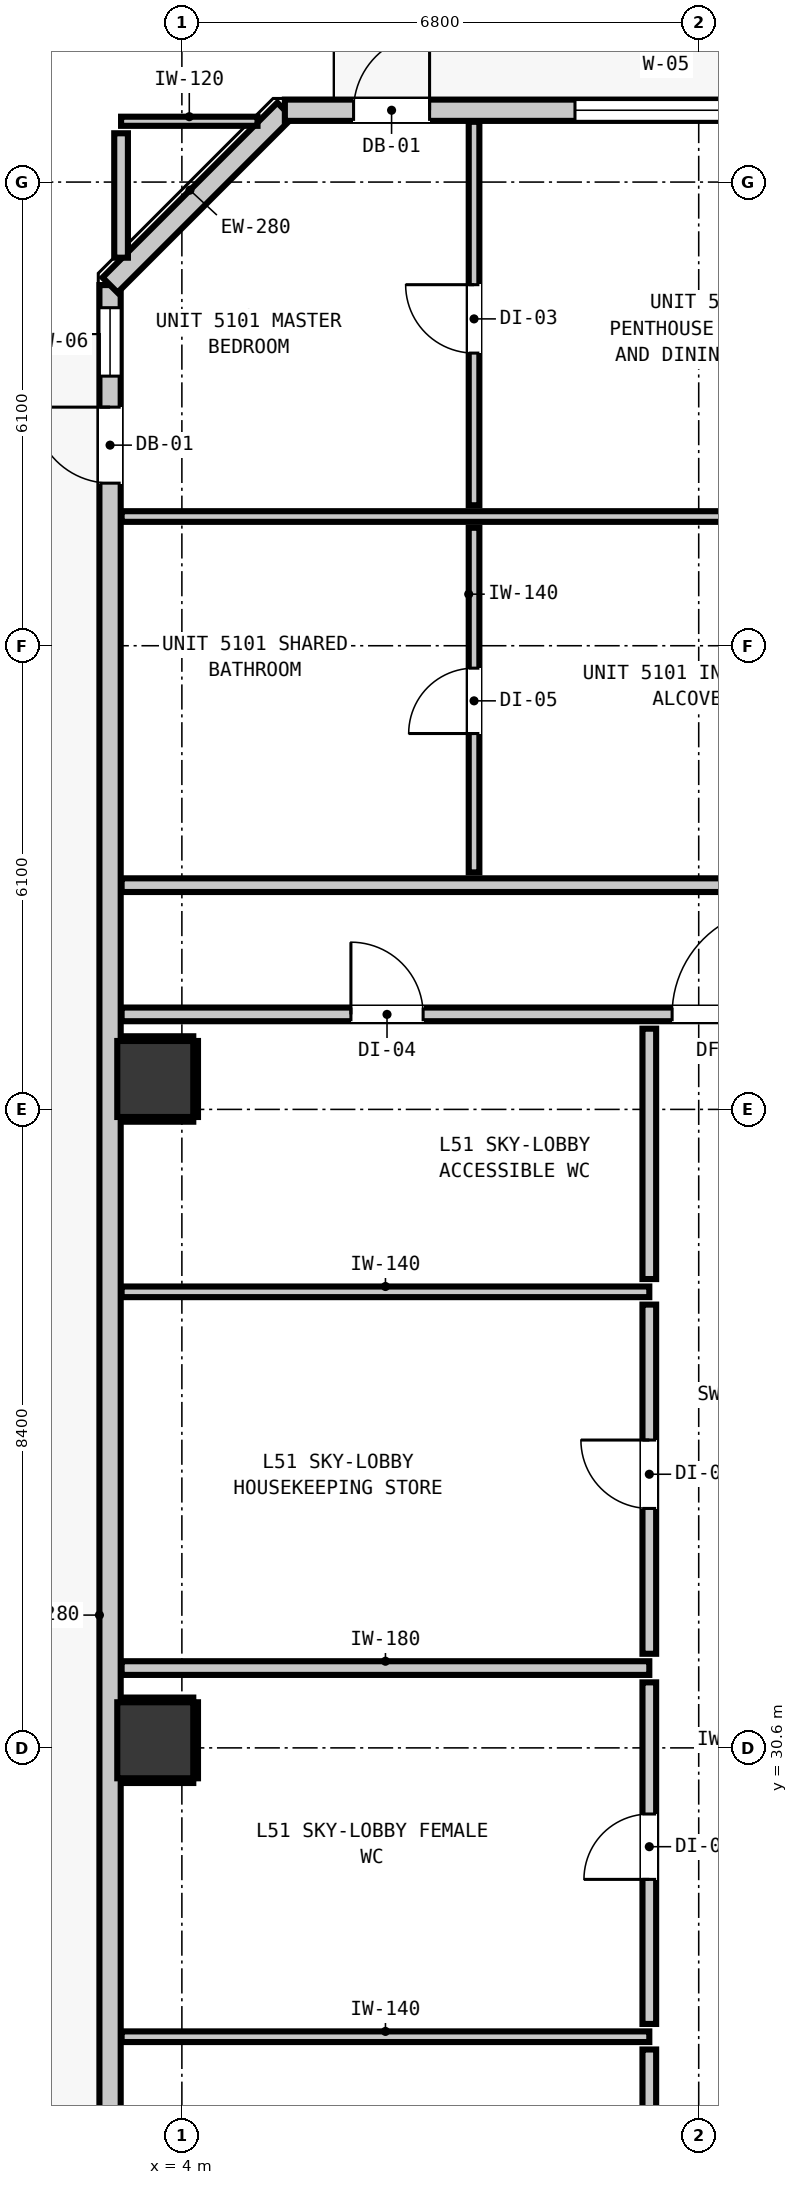
"""IFC4 building model, lengths in metres.
Left out: names, types, materials, properties, quantities, classifications, styles, units other than length and angle.
Written with IfcOpenShell. Run it as: python <this file> out.ifc"""

import sys

from ifc_helpers import new_model, si_unit, direction, frame, frame_2d, origin, origin_2d, place, context, subcontext, project, spatial, rectangle, extrude, element, fill, save


model = new_model("IFC4")
c1 = context("Model", 3, precision=1e-05, world=origin(), true_north=direction((0.0, 1.0)))
c2 = subcontext(c1, "Body", "Model", "MODEL_VIEW")
j1 = project(units=[si_unit("LENGTHUNIT", "METRE"), si_unit("PLANEANGLEUNIT", "RADIAN")], contexts=[c1])
p1 = place(None, origin())
s1 = spatial("IfcSite", under=j1, at=p1, CompositionType="ELEMENT")
p2 = place(p1, origin())
s2 = spatial("IfcBuilding", under=s1, at=p2, CompositionType="ELEMENT")
p3 = place(p2, frame((0.0, 0.0, 176.88)))
s3 = spatial("IfcBuildingStorey", under=s2, at=p3, CompositionType="ELEMENT", Elevation=176.88)
for number, where, z_axis, x_axis in (
    (1, (3.65, 30.7, 0.0), (0.0, 0.0, 1.0), (1.0, 0.0, 0.0)),
    (2, (3.65, 39.4, 0.0), (0.0, 0.0, 1.0), (1.0, 0.0, 0.0)),
):
    element("IfcColumn", number, at=place(p3, frame(where, z_axis=z_axis, x_axis=x_axis)), inside=s3, PredefinedType="COLUMN", context=c2, shape_type="SweptSolid", body=[
        extrude(rectangle(XDim=1.0, YDim=1.0, at=origin_2d()), origin(), (0.0, 0.0, 1.0), 3.32),
    ])
p4 = place(p3, frame((3.055, 17.555, 0.0), z_axis=(0.0, 0.0, 1.0), x_axis=(0.0, 1.0, 0.0)))
e3 = element("IfcWall", 3, at=p4, inside=s3, PredefinedType="STANDARD", context=c2, shape_type="SweptSolid", body=[
    extrude(rectangle(XDim=32.29, YDim=0.28, at=frame_2d((16.145, 0.0))), origin(), (0.0, 0.0, 1.0), 3.08),
])
p5 = place(p4, frame((29.684, 0.0, 0.0)))
e4 = element("IfcOpeningElement", 4, at=p5, cuts=e3, PredefinedType="OPENING", context=c2, shape_type="SweptSolid", body=[
    extrude(rectangle(XDim=1.0, YDim=2.15, at=frame_2d((0.5, 1.075))), frame((0.0, 0.15, 0.0), z_axis=(0.0, -1.0, 0.0), x_axis=(1.0, 0.0, 0.0)), (0.0, 0.0, 1.0), 0.3),
])
p6 = place(p4, frame((31.092, 0.0, 0.85)))
e5 = element("IfcOpeningElement", 5, at=p6, cuts=e3, PredefinedType="OPENING", context=c2, shape_type="SweptSolid", body=[
    extrude(rectangle(XDim=0.9, YDim=1.5, at=frame_2d((0.45, 0.75))), frame((0.0, 0.15, 0.0), z_axis=(0.0, -1.0, 0.0), x_axis=(1.0, 0.0, 0.0)), (0.0, 0.0, 1.0), 0.3),
])
p7 = place(p3, frame((3.055, 49.845, 0.0), z_axis=(0.0, 0.0, 1.0), x_axis=(0.707106781187, 0.707106781187, 0.0)))
e6 = element("IfcWall", 6, at=p7, inside=s3, PredefinedType="STANDARD", context=c2, shape_type="SweptSolid", body=[
    extrude(rectangle(XDim=3.253, YDim=0.28, at=frame_2d((1.626, 0.0))), origin(), (0.0, 0.0, 1.0), 3.08),
])
p8 = place(p3, frame((5.355, 52.145, 0.0), z_axis=(0.0, 0.0, 1.0), x_axis=(1.0, 0.0, 0.0)))
e7 = element("IfcWall", 7, at=p8, inside=s3, PredefinedType="STANDARD", context=c2, shape_type="SweptSolid", body=[
    extrude(rectangle(XDim=35.09, YDim=0.28, at=frame_2d((17.545, 0.0))), origin(), (0.0, 0.0, 1.0), 3.08),
])
p9 = place(p8, frame((0.904, 0.0, 0.0)))
e8 = element("IfcOpeningElement", 8, at=p9, cuts=e7, PredefinedType="OPENING", context=c2, shape_type="SweptSolid", body=[
    extrude(rectangle(XDim=1.0, YDim=2.15, at=frame_2d((0.5, 1.075))), frame((0.0, 0.15, 0.0), z_axis=(0.0, -1.0, 0.0), x_axis=(1.0, 0.0, 0.0)), (0.0, 0.0, 1.0), 0.3),
])
p10 = place(p8, frame((3.817, 0.0, 0.85)))
e9 = element("IfcOpeningElement", 9, at=p10, cuts=e7, PredefinedType="OPENING", context=c2, shape_type="SweptSolid", body=[
    extrude(rectangle(XDim=2.4, YDim=1.95, at=frame_2d((1.2, 0.975))), frame((0.0, 0.15, 0.0), z_axis=(0.0, -1.0, 0.0), x_axis=(1.0, 0.0, 0.0)), (0.0, 0.0, 1.0), 0.3),
])
p11 = place(p8, frame((16.495, 0.0, 0.85)))
e10 = element("IfcOpeningElement", 10, at=p11, cuts=e7, PredefinedType="OPENING", context=c2, shape_type="SweptSolid", body=[
    extrude(rectangle(XDim=2.4, YDim=1.95, at=frame_2d((1.2, 0.975))), frame((0.0, 0.15, 0.0), z_axis=(0.0, -1.0, 0.0), x_axis=(1.0, 0.0, 0.0)), (0.0, 0.0, 1.0), 0.3),
])
p12 = place(p8, frame((26.295, 0.0, 0.85)))
e11 = element("IfcOpeningElement", 11, at=p12, cuts=e7, PredefinedType="OPENING", context=c2, shape_type="SweptSolid", body=[
    extrude(rectangle(XDim=2.4, YDim=1.95, at=frame_2d((1.2, 0.975))), frame((0.0, 0.15, 0.0), z_axis=(0.0, -1.0, 0.0), x_axis=(1.0, 0.0, 0.0)), (0.0, 0.0, 1.0), 0.3),
])
p13 = place(p8, frame((20.33, 0.0, 0.85)))
e12 = element("IfcOpeningElement", 12, at=p13, cuts=e7, PredefinedType="OPENING", context=c2, shape_type="SweptSolid", body=[
    extrude(rectangle(XDim=1.05, YDim=1.65, at=frame_2d((0.525, 0.825))), frame((0.0, 0.15, 0.0), z_axis=(0.0, -1.0, 0.0), x_axis=(1.0, 0.0, 0.0)), (0.0, 0.0, 1.0), 0.3),
])
p14 = place(p8, frame((33.387, 0.0, 0.85)))
e13 = element("IfcOpeningElement", 13, at=p14, cuts=e7, PredefinedType="OPENING", context=c2, shape_type="SweptSolid", body=[
    extrude(rectangle(XDim=1.05, YDim=1.65, at=frame_2d((0.525, 0.825))), frame((0.0, 0.15, 0.0), z_axis=(0.0, -1.0, 0.0), x_axis=(1.0, 0.0, 0.0)), (0.0, 0.0, 1.0), 0.3),
])
p15 = place(p3, frame((3.207, 31.65, 0.0), z_axis=(0.0, 0.0, 1.0), x_axis=(1.0, 0.0, 0.0)))
e14 = element("IfcWall", 14, at=p15, inside=s3, PredefinedType="PARTITIONING", context=c2, shape_type="SweptSolid", body=[
    extrude(rectangle(XDim=6.943, YDim=0.18, at=frame_2d((3.471, 0.0))), origin(), (0.0, 0.0, 1.0), 3.08),
])
p16 = place(p3, frame((3.207, 40.25, 0.0), z_axis=(0.0, 0.0, 1.0), x_axis=(1.0, 0.0, 0.0)))
e15 = element("IfcWall", 15, at=p16, inside=s3, PredefinedType="PARTITIONING", context=c2, shape_type="SweptSolid", body=[
    extrude(rectangle(XDim=39.386, YDim=0.18, at=frame_2d((19.693, 0.0))), origin(), (0.0, 0.0, 1.0), 3.08),
])
p17 = place(p16, frame((14.228, 0.0, 0.0)))
e16 = element("IfcOpeningElement", 16, at=p17, cuts=e15, PredefinedType="OPENING", context=c2, shape_type="SweptSolid", body=[
    extrude(rectangle(XDim=1.4, YDim=2.15, at=frame_2d((0.7, 1.075))), frame((0.0, 0.1, 0.0), z_axis=(0.0, -1.0, 0.0), x_axis=(1.0, 0.0, 0.0)), (0.0, 0.0, 1.0), 0.2),
])
p18 = place(p16, frame((7.243, 0.0, 0.0)))
e17 = element("IfcOpeningElement", 17, at=p18, cuts=e15, PredefinedType="OPENING", context=c2, shape_type="SweptSolid", body=[
    extrude(rectangle(XDim=1.4, YDim=2.15, at=frame_2d((0.7, 1.075))), frame((0.0, 0.1, 0.0), z_axis=(0.0, -1.0, 0.0), x_axis=(1.0, 0.0, 0.0)), (0.0, 0.0, 1.0), 0.2),
])
p19 = place(p16, frame((3.017, 0.0, 0.0)))
e18 = element("IfcOpeningElement", 18, at=p19, cuts=e15, PredefinedType="OPENING", context=c2, shape_type="SweptSolid", body=[
    extrude(rectangle(XDim=0.95, YDim=2.1, at=frame_2d((0.475, 1.05))), frame((0.0, 0.1, 0.0), z_axis=(0.0, -1.0, 0.0), x_axis=(1.0, 0.0, 0.0)), (0.0, 0.0, 1.0), 0.2),
])
p20 = place(p3, frame((3.207, 41.95, 0.0), z_axis=(0.0, 0.0, 1.0), x_axis=(1.0, 0.0, 0.0)))
e19 = element("IfcWall", 19, at=p20, inside=s3, PredefinedType="PARTITIONING", context=c2, shape_type="SweptSolid", body=[
    extrude(rectangle(XDim=39.386, YDim=0.18, at=frame_2d((19.693, 0.0))), origin(), (0.0, 0.0, 1.0), 3.08),
])
p21 = place(p20, frame((9.55, 0.0, 0.0)))
e20 = element("IfcOpeningElement", 20, at=p21, cuts=e19, PredefinedType="OPENING", context=c2, shape_type="SweptSolid", body=[
    extrude(rectangle(XDim=1.0, YDim=2.15, at=frame_2d((0.5, 1.075))), frame((0.0, 0.1, 0.0), z_axis=(0.0, -1.0, 0.0), x_axis=(1.0, 0.0, 0.0)), (0.0, 0.0, 1.0), 0.2),
])
p22 = place(p20, frame((29.143, 0.0, 0.0)))
e21 = element("IfcOpeningElement", 21, at=p22, cuts=e19, PredefinedType="OPENING", context=c2, shape_type="SweptSolid", body=[
    extrude(rectangle(XDim=1.0, YDim=2.15, at=frame_2d((0.5, 1.075))), frame((0.0, 0.1, 0.0), z_axis=(0.0, -1.0, 0.0), x_axis=(1.0, 0.0, 0.0)), (0.0, 0.0, 1.0), 0.2),
])
for number, where, z_axis, x_axis in (
    (22, (3.207, 26.8, 0.0), (0.0, 0.0, 1.0), (1.0, 0.0, 0.0)),
    (23, (3.207, 36.6, 0.0), (0.0, 0.0, 1.0), (1.0, 0.0, 0.0)),
):
    element("IfcWall", number, at=place(p3, frame(where, z_axis=z_axis, x_axis=x_axis)), inside=s3, PredefinedType="PARTITIONING", context=c2, shape_type="SweptSolid", body=[
        extrude(rectangle(XDim=6.943, YDim=0.14, at=frame_2d((3.471, 0.0))), origin(), (0.0, 0.0, 1.0), 3.08),
    ])
p23 = place(p3, frame((3.207, 46.8, 0.0), z_axis=(0.0, 0.0, 1.0), x_axis=(1.0, 0.0, 0.0)))
e24 = element("IfcWall", 24, at=p23, inside=s3, PredefinedType="PARTITIONING", context=c2, shape_type="SweptSolid", body=[
    extrude(rectangle(XDim=39.386, YDim=0.14, at=frame_2d((19.693, 0.0))), origin(), (0.0, 0.0, 1.0), 3.08),
])
p24 = place(p23, frame((9.6, 0.0, 0.0)))
e25 = element("IfcOpeningElement", 25, at=p24, cuts=e24, PredefinedType="OPENING", context=c2, shape_type="SweptSolid", body=[
    extrude(rectangle(XDim=0.9, YDim=2.1, at=frame_2d((0.45, 1.05))), frame((0.0, 0.08, 0.0), z_axis=(0.0, -1.0, 0.0), x_axis=(1.0, 0.0, 0.0)), (0.0, 0.0, 1.0), 0.16),
])
p25 = place(p23, frame((29.193, 0.0, 0.0)))
e26 = element("IfcOpeningElement", 26, at=p25, cuts=e24, PredefinedType="OPENING", context=c2, shape_type="SweptSolid", body=[
    extrude(rectangle(XDim=0.9, YDim=2.1, at=frame_2d((0.45, 1.05))), frame((0.0, 0.08, 0.0), z_axis=(0.0, -1.0, 0.0), x_axis=(1.0, 0.0, 0.0)), (0.0, 0.0, 1.0), 0.16),
])
p26 = place(p3, frame((3.2, 52.0, 0.0), z_axis=(0.0, 0.0, 1.0), x_axis=(1.0, 0.0, 0.0)))
e27 = element("IfcWall", 27, at=p26, inside=s3, PredefinedType="PARTITIONING", context=c2, shape_type="SweptSolid", body=[
    extrude(rectangle(XDim=1.795, YDim=0.12, at=frame_2d((0.897, 0.0))), origin(), (0.0, 0.0, 1.0), 3.08),
])
p27 = place(p3, frame((3.2, 50.205, 0.0), z_axis=(0.0, 0.0, 1.0), x_axis=(0.0, 1.0, 0.0)))
e28 = element("IfcWall", 28, at=p27, inside=s3, PredefinedType="PARTITIONING", context=c2, shape_type="SweptSolid", body=[
    extrude(rectangle(XDim=1.637, YDim=0.18, at=frame_2d((0.818, 0.0))), origin(), (0.0, 0.0, 1.0), 3.08),
])
p28 = place(p3, frame((10.15, 21.368, 0.0), z_axis=(0.0, 0.0, 1.0), x_axis=(0.0, 1.0, 0.0)))
e29 = element("IfcWall", 29, at=p28, inside=s3, PredefinedType="PARTITIONING", context=c2, shape_type="SweptSolid", body=[
    extrude(rectangle(XDim=5.264, YDim=0.18, at=frame_2d((2.632, 0.0))), origin(), (0.0, 0.0, 1.0), 3.08),
])
p29 = place(p3, frame((10.15, 26.968, 0.0), z_axis=(0.0, 0.0, 1.0), x_axis=(0.0, 1.0, 0.0)))
e30 = element("IfcWall", 30, at=p29, inside=s3, PredefinedType="PARTITIONING", context=c2, shape_type="SweptSolid", body=[
    extrude(rectangle(XDim=4.494, YDim=0.18, at=frame_2d((2.247, 0.0))), origin(), (0.0, 0.0, 1.0), 3.08),
])
p30 = place(p29, frame((1.902, 0.0, 0.0)))
e31 = element("IfcOpeningElement", 31, at=p30, cuts=e30, PredefinedType="OPENING", context=c2, shape_type="SweptSolid", body=[
    extrude(rectangle(XDim=0.86, YDim=2.02, at=frame_2d((0.43, 1.01))), frame((0.0, 0.1, 0.0), z_axis=(0.0, -1.0, 0.0), x_axis=(1.0, 0.0, 0.0)), (0.0, 0.0, 1.0), 0.2),
])
p31 = place(p3, frame((10.15, 31.838, 0.0), z_axis=(0.0, 0.0, 1.0), x_axis=(0.0, 1.0, 0.0)))
e32 = element("IfcWall", 32, at=p31, inside=s3, PredefinedType="PARTITIONING", context=c2, shape_type="SweptSolid", body=[
    extrude(rectangle(XDim=4.594, YDim=0.18, at=frame_2d((2.297, 0.0))), origin(), (0.0, 0.0, 1.0), 3.08),
])
p32 = place(p31, frame((1.912, 0.0, 0.0)))
e33 = element("IfcOpeningElement", 33, at=p32, cuts=e32, PredefinedType="OPENING", context=c2, shape_type="SweptSolid", body=[
    extrude(rectangle(XDim=0.9, YDim=2.1, at=frame_2d((0.45, 1.05))), frame((0.0, 0.1, 0.0), z_axis=(0.0, -1.0, 0.0), x_axis=(1.0, 0.0, 0.0)), (0.0, 0.0, 1.0), 0.2),
])
p33 = place(p3, frame((10.15, 36.768, 0.0), z_axis=(0.0, 0.0, 1.0), x_axis=(0.0, 1.0, 0.0)))
e34 = element("IfcWall", 34, at=p33, inside=s3, PredefinedType="PARTITIONING", context=c2, shape_type="SweptSolid", body=[
    extrude(rectangle(XDim=3.294, YDim=0.18, at=frame_2d((1.647, 0.0))), origin(), (0.0, 0.0, 1.0), 3.08),
])
p34 = place(p3, frame((7.844, 42.118, 0.0), z_axis=(0.0, 0.0, 1.0), x_axis=(0.0, 1.0, 0.0)))
e35 = element("IfcWall", 35, at=p34, inside=s3, PredefinedType="PARTITIONING", context=c2, shape_type="SweptSolid", body=[
    extrude(rectangle(XDim=4.534, YDim=0.14, at=frame_2d((2.267, 0.0))), origin(), (0.0, 0.0, 1.0), 3.08),
])
p35 = place(p34, frame((1.827, 0.0, 0.0)))
e36 = element("IfcOpeningElement", 36, at=p35, cuts=e35, PredefinedType="OPENING", context=c2, shape_type="SweptSolid", body=[
    extrude(rectangle(XDim=0.86, YDim=2.02, at=frame_2d((0.43, 1.01))), frame((0.0, 0.08, 0.0), z_axis=(0.0, -1.0, 0.0), x_axis=(1.0, 0.0, 0.0)), (0.0, 0.0, 1.0), 0.16),
])
p36 = place(p3, frame((7.844, 46.948, 0.0), z_axis=(0.0, 0.0, 1.0), x_axis=(0.0, 1.0, 0.0)))
e37 = element("IfcWall", 37, at=p36, inside=s3, PredefinedType="PARTITIONING", context=c2, shape_type="SweptSolid", body=[
    extrude(rectangle(XDim=5.045, YDim=0.14, at=frame_2d((2.522, 0.0))), origin(), (0.0, 0.0, 1.0), 3.08),
])
p37 = place(p36, frame((2.002, 0.0, 0.0)))
e38 = element("IfcOpeningElement", 38, at=p37, cuts=e37, PredefinedType="OPENING", context=c2, shape_type="SweptSolid", body=[
    extrude(rectangle(XDim=0.9, YDim=2.1, at=frame_2d((0.45, 1.05))), frame((0.0, 0.08, 0.0), z_axis=(0.0, -1.0, 0.0), x_axis=(1.0, 0.0, 0.0)), (0.0, 0.0, 1.0), 0.16),
])
for number, where, z_axis, x_axis in (
    (39, (3.21, 30.168, 0.0), (0.0, 0.0, 1.0), (1.0, 0.0, 0.0)),
    (40, (3.21, 31.232, 0.0), (0.0, 0.0, 1.0), (1.0, 0.0, 0.0)),
):
    element("IfcWall", number, at=place(p3, frame(where, z_axis=z_axis, x_axis=x_axis)), inside=s3, PredefinedType="PARTITIONING", context=c2, shape_type="SweptSolid", body=[
        extrude(rectangle(XDim=0.94, YDim=0.06, at=frame_2d((0.47, 0.0))), origin(), (0.0, 0.0, 1.0), 1.45),
    ])
p38 = place(p3, frame((4.182, 30.2, 0.0), z_axis=(0.0, 0.0, 1.0), x_axis=(0.0, 1.0, 0.0)))
e41 = element("IfcWall", 41, at=p38, inside=s3, PredefinedType="PARTITIONING", context=c2, shape_type="SweptSolid", body=[
    extrude(rectangle(XDim=1.0, YDim=0.06, at=frame_2d((0.5, 0.0))), origin(), (0.0, 0.0, 1.0), 1.45),
])
for number, where, z_axis, x_axis in (
    (42, (3.21, 38.868, 0.0), (0.0, 0.0, 1.0), (1.0, 0.0, 0.0)),
    (43, (3.21, 39.932, 0.0), (0.0, 0.0, 1.0), (1.0, 0.0, 0.0)),
):
    element("IfcWall", number, at=place(p3, frame(where, z_axis=z_axis, x_axis=x_axis)), inside=s3, PredefinedType="PARTITIONING", context=c2, shape_type="SweptSolid", body=[
        extrude(rectangle(XDim=0.94, YDim=0.06, at=frame_2d((0.47, 0.0))), origin(), (0.0, 0.0, 1.0), 1.45),
    ])
p39 = place(p3, frame((4.182, 38.9, 0.0), z_axis=(0.0, 0.0, 1.0), x_axis=(0.0, 1.0, 0.0)))
e44 = element("IfcWall", 44, at=p39, inside=s3, PredefinedType="PARTITIONING", context=c2, shape_type="SweptSolid", body=[
    extrude(rectangle(XDim=1.0, YDim=0.06, at=frame_2d((0.5, 0.0))), origin(), (0.0, 0.0, 1.0), 1.45),
])
p40 = place(p9, origin())
e45 = element("IfcDoor", 45, at=p40, inside=s3, OperationType="SINGLE_SWING_RIGHT", PredefinedType="DOOR", context=c2, shape_type="SweptSolid", body=[
    extrude(rectangle(XDim=1.0, YDim=2.15, at=frame_2d((0.5, 1.075))), frame((0.0, 0.025, 0.0), z_axis=(0.0, -1.0, 0.0), x_axis=(1.0, 0.0, 0.0)), (0.0, 0.0, 1.0), 0.05),
])
fill(e8, e45)
p41 = place(p5, origin())
e46 = element("IfcDoor", 46, at=p41, inside=s3, OperationType="SINGLE_SWING_RIGHT", PredefinedType="DOOR", context=c2, shape_type="SweptSolid", body=[
    extrude(rectangle(XDim=1.0, YDim=2.15, at=frame_2d((0.5, 1.075))), frame((0.0, 0.025, 0.0), z_axis=(0.0, -1.0, 0.0), x_axis=(1.0, 0.0, 0.0)), (0.0, 0.0, 1.0), 0.05),
])
fill(e4, e46)
p42 = place(p6, origin())
e47 = element("IfcWindow", 47, at=p42, inside=s3, PartitioningType="SINGLE_PANEL", PredefinedType="WINDOW", context=c2, shape_type="SweptSolid", body=[
    extrude(rectangle(XDim=0.9, YDim=1.5, at=frame_2d((0.45, 0.75))), frame((0.0, 0.03, 0.0), z_axis=(0.0, -1.0, 0.0), x_axis=(1.0, 0.0, 0.0)), (0.0, 0.0, 1.0), 0.06),
])
fill(e5, e47)
p43 = place(p10, origin())
e48 = element("IfcWindow", 48, at=p43, inside=s3, PartitioningType="SINGLE_PANEL", PredefinedType="WINDOW", context=c2, shape_type="SweptSolid", body=[
    extrude(rectangle(XDim=2.4, YDim=1.95, at=frame_2d((1.2, 0.975))), frame((0.0, 0.03, 0.0), z_axis=(0.0, -1.0, 0.0), x_axis=(1.0, 0.0, 0.0)), (0.0, 0.0, 1.0), 0.06),
])
fill(e9, e48)
p44 = place(p18, origin())
e49 = element("IfcDoor", 49, at=p44, inside=s3, OperationType="SINGLE_SWING_RIGHT", PredefinedType="DOOR", context=c2, shape_type="SweptSolid", body=[
    extrude(rectangle(XDim=1.4, YDim=2.15, at=frame_2d((0.7, 1.075))), frame((0.0, 0.025, 0.0), z_axis=(0.0, -1.0, 0.0), x_axis=(1.0, 0.0, 0.0)), (0.0, 0.0, 1.0), 0.05),
])
fill(e17, e49)
p45 = place(p30, origin())
e50 = element("IfcDoor", 50, at=p45, inside=s3, OperationType="SINGLE_SWING_LEFT", PredefinedType="DOOR", context=c2, shape_type="SweptSolid", body=[
    extrude(rectangle(XDim=0.86, YDim=2.02, at=frame_2d((0.43, 1.01))), frame((0.0, 0.025, 0.0), z_axis=(0.0, -1.0, 0.0), x_axis=(1.0, 0.0, 0.0)), (0.0, 0.0, 1.0), 0.05),
])
fill(e31, e50)
p46 = place(p32, origin())
e51 = element("IfcDoor", 51, at=p46, inside=s3, OperationType="SINGLE_SWING_RIGHT", PredefinedType="DOOR", context=c2, shape_type="SweptSolid", body=[
    extrude(rectangle(XDim=0.9, YDim=2.1, at=frame_2d((0.45, 1.05))), frame((0.0, 0.025, 0.0), z_axis=(0.0, -1.0, 0.0), x_axis=(1.0, 0.0, 0.0)), (0.0, 0.0, 1.0), 0.05),
])
fill(e33, e51)
p47 = place(p19, origin())
e52 = element("IfcDoor", 52, at=p47, inside=s3, OperationType="SINGLE_SWING_LEFT", PredefinedType="DOOR", context=c2, shape_type="SweptSolid", body=[
    extrude(rectangle(XDim=0.95, YDim=2.1, at=frame_2d((0.475, 1.05))), frame((0.0, 0.025, 0.0), z_axis=(0.0, -1.0, 0.0), x_axis=(1.0, 0.0, 0.0)), (0.0, 0.0, 1.0), 0.05),
])
fill(e18, e52)
p48 = place(p35, origin())
e53 = element("IfcDoor", 53, at=p48, inside=s3, OperationType="SINGLE_SWING_LEFT", PredefinedType="DOOR", context=c2, shape_type="SweptSolid", body=[
    extrude(rectangle(XDim=0.86, YDim=2.02, at=frame_2d((0.43, 1.01))), frame((0.0, 0.025, 0.0), z_axis=(0.0, -1.0, 0.0), x_axis=(1.0, 0.0, 0.0)), (0.0, 0.0, 1.0), 0.05),
])
fill(e36, e53)
p49 = place(p37, origin())
e54 = element("IfcDoor", 54, at=p49, inside=s3, OperationType="SINGLE_SWING_RIGHT", PredefinedType="DOOR", context=c2, shape_type="SweptSolid", body=[
    extrude(rectangle(XDim=0.9, YDim=2.1, at=frame_2d((0.45, 1.05))), frame((0.0, 0.025, 0.0), z_axis=(0.0, -1.0, 0.0), x_axis=(1.0, 0.0, 0.0)), (0.0, 0.0, 1.0), 0.05),
])
fill(e38, e54)
save(model, sys.argv[1])
